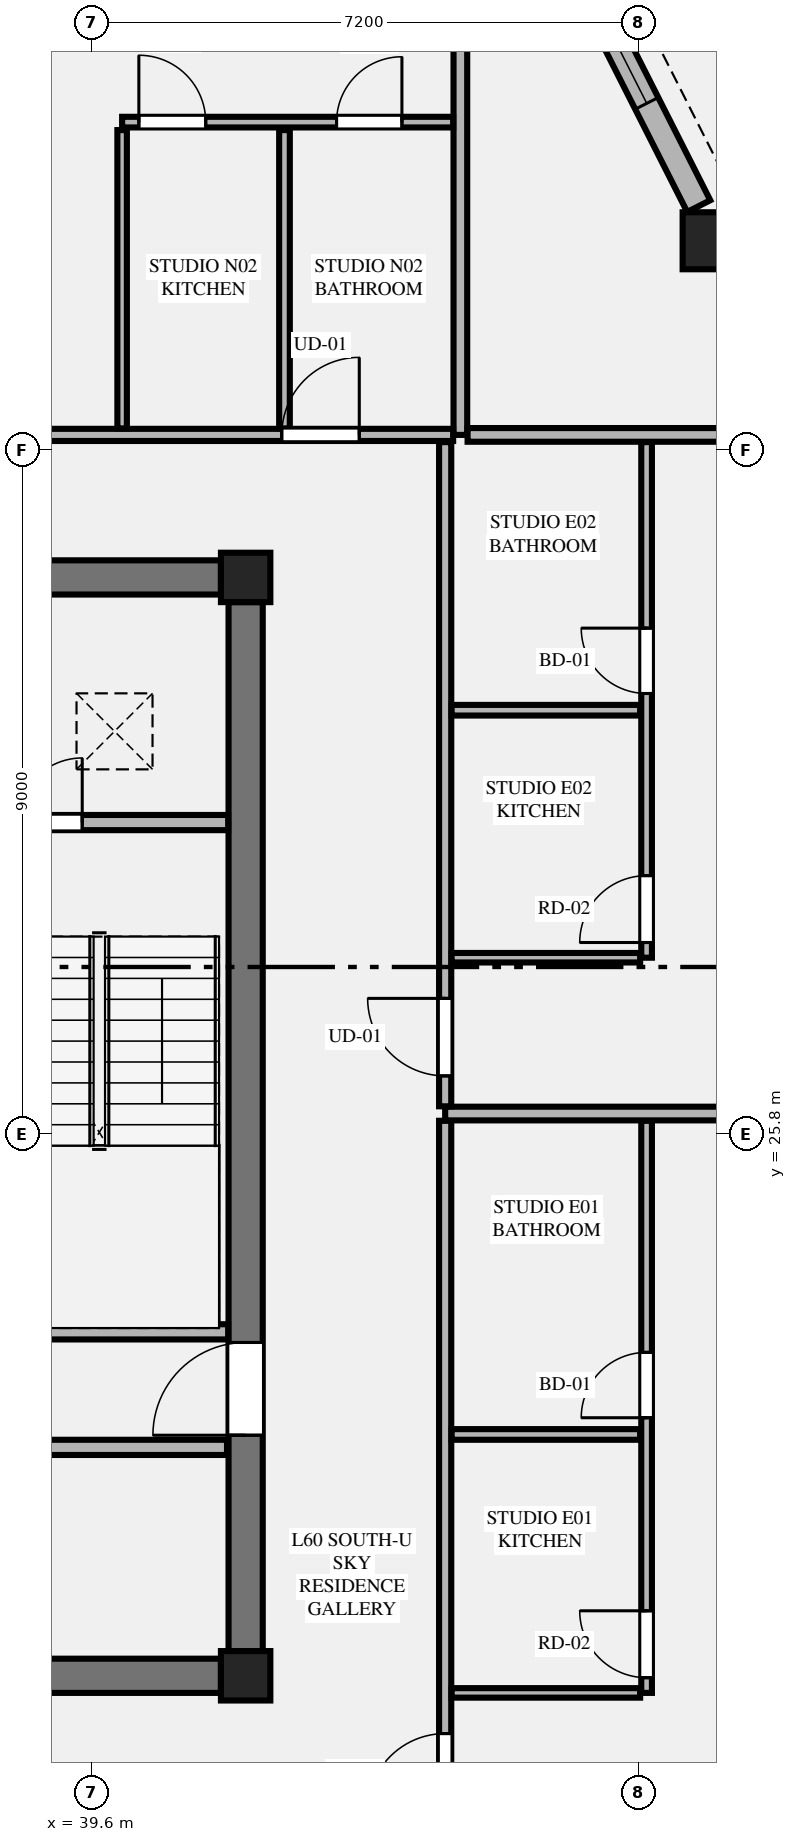
"""IFC4 building model, lengths in metres.
Left out: names, types, materials, properties, quantities, classifications, styles, units other than length and angle.
Written with IfcOpenShell. Run it as: python <this file> out.ifc"""

import sys

from ifc_helpers import new_model, si_unit, direction, frame, frame_2d, origin, origin_2d, place, context, subcontext, project, spatial, rectangle, extrude, element, fill, save


model = new_model("IFC4")
c1 = context("Model", 3, precision=1e-05, world=origin(), true_north=direction((0.0, 1.0)))
c2 = subcontext(c1, "Body", "Model", "MODEL_VIEW")
j1 = project(units=[si_unit("LENGTHUNIT", "METRE"), si_unit("PLANEANGLEUNIT", "RADIAN")], contexts=[c1])
p1 = place(None, origin())
s1 = spatial("IfcSite", under=j1, at=p1, CompositionType="ELEMENT")
p2 = place(p1, origin())
s2 = spatial("IfcBuilding", under=s1, at=p2, CompositionType="ELEMENT")
p3 = place(p2, frame((0.0, 0.0, 227.0)))
s3 = spatial("IfcBuildingStorey", under=s2, at=p3, CompositionType="ELEMENT", Elevation=227.0)
for number, where, z_axis, x_axis in (
    (1, (41.625, 18.675, 0.0), (0.0, 0.0, 1.0), (1.0, 0.0, 0.0)),
    (2, (41.625, 33.125, 0.0), (0.0, 0.0, 1.0), (1.0, 0.0, 0.0)),
):
    element("IfcColumn", number, at=place(p3, frame(where, z_axis=z_axis, x_axis=x_axis)), inside=s3, PredefinedType="COLUMN", context=c2, shape_type="SweptSolid", body=[
        extrude(rectangle(XDim=0.65, YDim=0.65, at=origin_2d()), origin(), (0.0, 0.0, 1.0), 3.65),
    ])
for number, where, z_axis, x_axis in (
    (3, (23.5, 18.675, 0.0), (0.0, 0.0, 1.0), (1.0, 0.0, 0.0)),
    (4, (23.5, 33.125, 0.0), (0.0, 0.0, 1.0), (1.0, 0.0, 0.0)),
):
    element("IfcWall", number, at=place(p3, frame(where, z_axis=z_axis, x_axis=x_axis)), inside=s3, PredefinedType="SHEAR", context=c2, shape_type="SweptSolid", body=[
        extrude(rectangle(XDim=17.8, YDim=0.45, at=frame_2d((8.9, 0.0))), origin(), (0.0, 0.0, 1.0), 3.45),
    ])
p4 = place(p3, frame((41.625, 19.0, 0.0), z_axis=(0.0, 0.0, 1.0), x_axis=(0.0, 1.0, 0.0)))
e5 = element("IfcWall", 5, at=p4, inside=s3, PredefinedType="SHEAR", context=c2, shape_type="SweptSolid", body=[
    extrude(rectangle(XDim=13.8, YDim=0.45, at=frame_2d((6.9, 0.0))), origin(), (0.0, 0.0, 1.0), 3.45),
])
p5 = place(p4, frame((2.84, 0.0, 0.0)))
e6 = element("IfcOpeningElement", 6, at=p5, cuts=e5, PredefinedType="OPENING", context=c2, shape_type="SweptSolid", body=[
    extrude(rectangle(XDim=1.22, YDim=2.25, at=frame_2d((0.61, 1.125))), frame((0.0, 0.235, 0.0), z_axis=(0.0, -1.0, 0.0), x_axis=(1.0, 0.0, 0.0)), (0.0, 0.0, 1.0), 0.47),
])
p6 = place(p3, frame((47.749, 37.554, 0.0), z_axis=(0.0, 0.0, 1.0), x_axis=(1.0, 0.0, 0.0)))
e7 = element("IfcColumn", 7, at=p6, inside=s3, PredefinedType="COLUMN", context=c2, shape_type="SweptSolid", body=[
    extrude(rectangle(XDim=0.75, YDim=0.75, at=origin_2d()), origin(), (0.0, 0.0, 1.0), 3.65),
])
p7 = place(p3, frame((38.125, 23.2, 0.0), z_axis=(0.0, 0.0, 1.0), x_axis=(1.0, 0.0, 0.0)))
e8 = element("IfcWall", 8, at=p7, inside=s3, PredefinedType="PLUMBINGWALL", context=c2, shape_type="SweptSolid", body=[
    extrude(rectangle(XDim=3.27, YDim=0.2, at=frame_2d((1.635, 0.0))), origin(), (0.0, 0.0, 1.0), 3.45),
])
p8 = place(p3, frame((38.125, 29.9, 0.0), z_axis=(0.0, 0.0, 1.0), x_axis=(1.0, 0.0, 0.0)))
e9 = element("IfcWall", 9, at=p8, inside=s3, PredefinedType="PLUMBINGWALL", context=c2, shape_type="SweptSolid", body=[
    extrude(rectangle(XDim=3.27, YDim=0.2, at=frame_2d((1.635, 0.0))), origin(), (0.0, 0.0, 1.0), 3.45),
])
p9 = place(p8, frame((0.5, 0.0, 0.0)))
e10 = element("IfcOpeningElement", 10, at=p9, cuts=e9, PredefinedType="OPENING", context=c2, shape_type="SweptSolid", body=[
    extrude(rectangle(XDim=0.85, YDim=2.05, at=frame_2d((0.425, 1.025))), frame((0.0, 0.11, 0.0), z_axis=(0.0, -1.0, 0.0), x_axis=(1.0, 0.0, 0.0)), (0.0, 0.0, 1.0), 0.22),
])
p10 = place(p3, frame((23.42, 21.68, 0.0), z_axis=(0.0, 0.0, 1.0), x_axis=(1.0, 0.0, 0.0)))
e11 = element("IfcWall", 11, at=p10, inside=s3, PredefinedType="PLUMBINGWALL", context=c2, shape_type="SweptSolid", body=[
    extrude(rectangle(XDim=17.96, YDim=0.2, at=frame_2d((8.98, 0.0))), origin(), (0.0, 0.0, 1.0), 3.45),
])
p11 = place(p10, frame((0.46, 0.0, 0.0)))
e12 = element("IfcOpeningElement", 12, at=p11, cuts=e11, PredefinedType="OPENING", context=c2, shape_type="SweptSolid", body=[
    extrude(rectangle(XDim=0.92, YDim=2.15, at=frame_2d((0.46, 1.075))), frame((0.0, 0.11, 0.0), z_axis=(0.0, -1.0, 0.0), x_axis=(1.0, 0.0, 0.0)), (0.0, 0.0, 1.0), 0.22),
])
p12 = place(p10, frame((9.48, 0.0, 0.0)))
e13 = element("IfcOpeningElement", 13, at=p12, cuts=e11, PredefinedType="OPENING", context=c2, shape_type="SweptSolid", body=[
    extrude(rectangle(XDim=0.92, YDim=2.15, at=frame_2d((0.46, 1.075))), frame((0.0, 0.11, 0.0), z_axis=(0.0, -1.0, 0.0), x_axis=(1.0, 0.0, 0.0)), (0.0, 0.0, 1.0), 0.22),
])
p13 = place(p3, frame((47.586, 38.01, 0.0), z_axis=(0.0, 0.0, 1.0), x_axis=(-0.451463046281, 0.89228981718, 0.0)))
e14 = element("IfcWall", 14, at=p13, inside=s3, PredefinedType="STANDARD", context=c2, shape_type="SweptSolid", body=[
    extrude(rectangle(XDim=4.43, YDim=0.34, at=frame_2d((2.215, 0.0))), origin(), (0.0, 0.0, 1.0), 2.983),
])
p14 = place(p13, frame((1.515, 0.0, 0.75)))
e15 = element("IfcOpeningElement", 15, at=p14, cuts=e14, PredefinedType="OPENING", context=c2, shape_type="SweptSolid", body=[
    extrude(rectangle(XDim=1.4, YDim=2.05, at=frame_2d((0.7, 1.025))), frame((0.0, 0.18, 0.0), z_axis=(0.0, -1.0, 0.0), x_axis=(1.0, 0.0, 0.0)), (0.0, 0.0, 1.0), 0.36),
])
p15 = place(p3, frame((44.45, 35.0, 0.0), z_axis=(0.0, 0.0, 1.0), x_axis=(0.0, 1.0, 0.0)))
e16 = element("IfcWall", 16, at=p15, inside=s3, PredefinedType="PARTITIONING", context=c2, shape_type="SweptSolid", body=[
    extrude(rectangle(XDim=8.481, YDim=0.18, at=frame_2d((4.24, 0.0))), origin(), (0.0, 0.0, 1.0), 3.45),
])
p16 = place(p3, frame((35.749, 35.0, 0.0), z_axis=(0.0, 0.0, 1.0), x_axis=(1.0, 0.0, 0.0)))
e17 = element("IfcWall", 17, at=p16, inside=s3, PredefinedType="PARTITIONING", context=c2, shape_type="SweptSolid", body=[
    extrude(rectangle(XDim=8.606, YDim=0.16, at=frame_2d((4.303, 0.0))), origin(), (0.0, 0.0, 1.0), 3.45),
])
p17 = place(p16, frame((6.351, 0.0, 0.0)))
e18 = element("IfcOpeningElement", 18, at=p17, cuts=e17, PredefinedType="OPENING", context=c2, shape_type="SweptSolid", body=[
    extrude(rectangle(XDim=1.02, YDim=2.25, at=frame_2d((0.51, 1.125))), frame((0.0, 0.09, 0.0), z_axis=(0.0, -1.0, 0.0), x_axis=(1.0, 0.0, 0.0)), (0.0, 0.0, 1.0), 0.18),
])
p18 = place(p3, frame((40.0, 35.085, 0.0), z_axis=(0.0, 0.0, 1.0), x_axis=(0.0, 1.0, 0.0)))
e19 = element("IfcWall", 19, at=p18, inside=s3, PredefinedType="PARTITIONING", context=c2, shape_type="SweptSolid", body=[
    extrude(rectangle(XDim=3.925, YDim=0.125, at=frame_2d((1.962, 0.0))), origin(), (0.0, 0.0, 1.0), 3.45),
])
p19 = place(p3, frame((40.0, 39.115, 0.0), z_axis=(0.0, 0.0, 1.0), x_axis=(1.0, 0.0, 0.0)))
e20 = element("IfcWall", 20, at=p19, inside=s3, PredefinedType="PLUMBINGWALL", context=c2, shape_type="SweptSolid", body=[
    extrude(rectangle(XDim=4.355, YDim=0.14, at=frame_2d((2.177, 0.0))), origin(), (0.0, 0.0, 1.0), 3.45),
])
p20 = place(p19, frame((2.821, 0.0, 0.0)))
e21 = element("IfcOpeningElement", 21, at=p20, cuts=e20, PredefinedType="OPENING", context=c2, shape_type="SweptSolid", body=[
    extrude(rectangle(XDim=0.86, YDim=2.1, at=frame_2d((0.43, 1.05))), frame((0.0, 0.08, 0.0), z_axis=(0.0, -1.0, 0.0), x_axis=(1.0, 0.0, 0.0)), (0.0, 0.0, 1.0), 0.16),
])
p21 = place(p19, frame((0.22, 0.0, 0.0)))
e22 = element("IfcOpeningElement", 22, at=p21, cuts=e20, PredefinedType="OPENING", context=c2, shape_type="SweptSolid", body=[
    extrude(rectangle(XDim=0.88, YDim=2.15, at=frame_2d((0.44, 1.075))), frame((0.0, 0.08, 0.0), z_axis=(0.0, -1.0, 0.0), x_axis=(1.0, 0.0, 0.0)), (0.0, 0.0, 1.0), 0.16),
])
p22 = place(p3, frame((42.136, 35.085, 0.0), z_axis=(0.0, 0.0, 1.0), x_axis=(0.0, 1.0, 0.0)))
e23 = element("IfcWall", 23, at=p22, inside=s3, PredefinedType="PLUMBINGWALL", context=c2, shape_type="SweptSolid", body=[
    extrude(rectangle(XDim=3.925, YDim=0.14, at=frame_2d((1.962, 0.0))), origin(), (0.0, 0.0, 1.0), 3.45),
])
p23 = place(p3, frame((44.545, 35.0, 0.0), z_axis=(0.0, 0.0, 1.0), x_axis=(1.0, 0.0, 0.0)))
e24 = element("IfcWall", 24, at=p23, inside=s3, PredefinedType="PARTITIONING", context=c2, shape_type="SweptSolid", body=[
    extrude(rectangle(XDim=4.322, YDim=0.18, at=frame_2d((2.161, 0.0))), origin(), (0.0, 0.0, 1.0), 3.45),
])
p24 = place(p3, frame((44.25, 16.495, 0.0), z_axis=(0.0, 0.0, 1.0), x_axis=(0.0, 1.0, 0.0)))
e25 = element("IfcWall", 25, at=p24, inside=s3, PredefinedType="PARTITIONING", context=c2, shape_type="SweptSolid", body=[
    extrude(rectangle(XDim=9.482, YDim=0.16, at=frame_2d((4.741, 0.0))), origin(), (0.0, 0.0, 1.0), 3.137),
])
p25 = place(p24, frame((0.4, 0.0, 0.0)))
e26 = element("IfcOpeningElement", 26, at=p25, cuts=e25, PredefinedType="OPENING", context=c2, shape_type="SweptSolid", body=[
    extrude(rectangle(XDim=1.02, YDim=2.25, at=frame_2d((0.51, 1.125))), frame((0.0, 0.09, 0.0), z_axis=(0.0, -1.0, 0.0), x_axis=(1.0, 0.0, 0.0)), (0.0, 0.0, 1.0), 0.18),
])
p26 = place(p3, frame((44.335, 18.45, 0.0), z_axis=(0.0, 0.0, 1.0), x_axis=(1.0, 0.0, 0.0)))
e27 = element("IfcWall", 27, at=p26, inside=s3, PredefinedType="PARTITIONING", context=c2, shape_type="SweptSolid", body=[
    extrude(rectangle(XDim=2.48, YDim=0.125, at=frame_2d((1.24, 0.0))), origin(), (0.0, 0.0, 1.0), 3.45),
])
p27 = place(p3, frame((46.9, 18.45, 0.0), z_axis=(0.0, 0.0, 1.0), x_axis=(0.0, 1.0, 0.0)))
e28 = element("IfcWall", 28, at=p27, inside=s3, PredefinedType="PLUMBINGWALL", context=c2, shape_type="SweptSolid", body=[
    extrude(rectangle(XDim=7.527, YDim=0.14, at=frame_2d((3.764, 0.0))), origin(), (0.0, 0.0, 1.0), 3.45),
])
p28 = place(p27, frame((3.62, 0.0, 0.0)))
e29 = element("IfcOpeningElement", 29, at=p28, cuts=e28, PredefinedType="OPENING", context=c2, shape_type="SweptSolid", body=[
    extrude(rectangle(XDim=0.86, YDim=2.1, at=frame_2d((0.43, 1.05))), frame((0.0, 0.08, 0.0), z_axis=(0.0, -1.0, 0.0), x_axis=(1.0, 0.0, 0.0)), (0.0, 0.0, 1.0), 0.16),
])
p29 = place(p27, frame((0.2, 0.0, 0.0)))
e30 = element("IfcOpeningElement", 30, at=p29, cuts=e28, PredefinedType="OPENING", context=c2, shape_type="SweptSolid", body=[
    extrude(rectangle(XDim=0.88, YDim=2.15, at=frame_2d((0.44, 1.075))), frame((0.0, 0.08, 0.0), z_axis=(0.0, -1.0, 0.0), x_axis=(1.0, 0.0, 0.0)), (0.0, 0.0, 1.0), 0.16),
])
p30 = place(p3, frame((44.335, 21.85, 0.0), z_axis=(0.0, 0.0, 1.0), x_axis=(1.0, 0.0, 0.0)))
e31 = element("IfcWall", 31, at=p30, inside=s3, PredefinedType="PLUMBINGWALL", context=c2, shape_type="SweptSolid", body=[
    extrude(rectangle(XDim=2.48, YDim=0.14, at=frame_2d((1.24, 0.0))), origin(), (0.0, 0.0, 1.0), 3.45),
])
p31 = place(p3, frame((44.25, 26.072, 0.0), z_axis=(0.0, 0.0, 1.0), x_axis=(1.0, 0.0, 0.0)))
e32 = element("IfcWall", 32, at=p31, inside=s3, PredefinedType="PARTITIONING", context=c2, shape_type="SweptSolid", body=[
    extrude(rectangle(XDim=8.898, YDim=0.18, at=frame_2d((4.449, 0.0))), origin(), (0.0, 0.0, 1.0), 3.45),
])
p32 = place(p3, frame((44.25, 26.167, 0.0), z_axis=(0.0, 0.0, 1.0), x_axis=(0.0, 1.0, 0.0)))
e33 = element("IfcWall", 33, at=p32, inside=s3, PredefinedType="PARTITIONING", context=c2, shape_type="SweptSolid", body=[
    extrude(rectangle(XDim=8.738, YDim=0.16, at=frame_2d((4.369, 0.0))), origin(), (0.0, 0.0, 1.0), 3.137),
])
p33 = place(p32, frame((0.4, 0.0, 0.0)))
e34 = element("IfcOpeningElement", 34, at=p33, cuts=e33, PredefinedType="OPENING", context=c2, shape_type="SweptSolid", body=[
    extrude(rectangle(XDim=1.02, YDim=2.25, at=frame_2d((0.51, 1.125))), frame((0.0, 0.09, 0.0), z_axis=(0.0, -1.0, 0.0), x_axis=(1.0, 0.0, 0.0)), (0.0, 0.0, 1.0), 0.18),
])
p34 = place(p3, frame((44.335, 28.122, 0.0), z_axis=(0.0, 0.0, 1.0), x_axis=(1.0, 0.0, 0.0)))
e35 = element("IfcWall", 35, at=p34, inside=s3, PredefinedType="PARTITIONING", context=c2, shape_type="SweptSolid", body=[
    extrude(rectangle(XDim=2.48, YDim=0.125, at=frame_2d((1.24, 0.0))), origin(), (0.0, 0.0, 1.0), 3.45),
])
p35 = place(p3, frame((46.9, 28.122, 0.0), z_axis=(0.0, 0.0, 1.0), x_axis=(0.0, 1.0, 0.0)))
e36 = element("IfcWall", 36, at=p35, inside=s3, PredefinedType="PLUMBINGWALL", context=c2, shape_type="SweptSolid", body=[
    extrude(rectangle(XDim=6.783, YDim=0.14, at=frame_2d((3.392, 0.0))), origin(), (0.0, 0.0, 1.0), 3.45),
])
p36 = place(p35, frame((3.476, 0.0, 0.0)))
e37 = element("IfcOpeningElement", 37, at=p36, cuts=e36, PredefinedType="OPENING", context=c2, shape_type="SweptSolid", body=[
    extrude(rectangle(XDim=0.86, YDim=2.1, at=frame_2d((0.43, 1.05))), frame((0.0, 0.08, 0.0), z_axis=(0.0, -1.0, 0.0), x_axis=(1.0, 0.0, 0.0)), (0.0, 0.0, 1.0), 0.16),
])
p37 = place(p35, frame((0.2, 0.0, 0.0)))
e38 = element("IfcOpeningElement", 38, at=p37, cuts=e36, PredefinedType="OPENING", context=c2, shape_type="SweptSolid", body=[
    extrude(rectangle(XDim=0.88, YDim=2.15, at=frame_2d((0.44, 1.075))), frame((0.0, 0.08, 0.0), z_axis=(0.0, -1.0, 0.0), x_axis=(1.0, 0.0, 0.0)), (0.0, 0.0, 1.0), 0.16),
])
p38 = place(p3, frame((44.335, 31.378, 0.0), z_axis=(0.0, 0.0, 1.0), x_axis=(1.0, 0.0, 0.0)))
e39 = element("IfcWall", 39, at=p38, inside=s3, PredefinedType="PLUMBINGWALL", context=c2, shape_type="SweptSolid", body=[
    extrude(rectangle(XDim=2.48, YDim=0.14, at=frame_2d((1.24, 0.0))), origin(), (0.0, 0.0, 1.0), 3.45),
])
p39 = place(p5, origin())
e40 = element("IfcDoor", 40, at=p39, inside=s3, OperationType="SINGLE_SWING_LEFT", PredefinedType="DOOR", context=c2, shape_type="SweptSolid", body=[
    extrude(rectangle(XDim=1.22, YDim=2.25, at=frame_2d((0.61, 1.125))), frame((0.0, 0.025, 0.0), z_axis=(0.0, -1.0, 0.0), x_axis=(1.0, 0.0, 0.0)), (0.0, 0.0, 1.0), 0.05),
])
fill(e6, e40)
p40 = place(p9, origin())
e41 = element("IfcDoor", 41, at=p40, inside=s3, OperationType="SINGLE_SWING_RIGHT", PredefinedType="DOOR", context=c2, shape_type="SweptSolid", body=[
    extrude(rectangle(XDim=0.85, YDim=2.05, at=frame_2d((0.425, 1.025))), frame((0.0, 0.025, 0.0), z_axis=(0.0, -1.0, 0.0), x_axis=(1.0, 0.0, 0.0)), (0.0, 0.0, 1.0), 0.05),
])
fill(e10, e41)
p41 = place(p14, origin())
e42 = element("IfcWindow", 42, at=p41, inside=s3, PartitioningType="SINGLE_PANEL", PredefinedType="WINDOW", context=c2, shape_type="SweptSolid", body=[
    extrude(rectangle(XDim=1.4, YDim=2.05, at=frame_2d((0.7, 1.025))), frame((0.0, 0.03, 0.0), z_axis=(0.0, -1.0, 0.0), x_axis=(1.0, 0.0, 0.0)), (0.0, 0.0, 1.0), 0.06),
])
fill(e15, e42)
p42 = place(p20, origin())
e43 = element("IfcDoor", 43, at=p42, inside=s3, OperationType="SINGLE_SWING_RIGHT", PredefinedType="DOOR", context=c2, shape_type="SweptSolid", body=[
    extrude(rectangle(XDim=0.86, YDim=2.1, at=frame_2d((0.43, 1.05))), frame((0.0, 0.025, 0.0), z_axis=(0.0, -1.0, 0.0), x_axis=(1.0, 0.0, 0.0)), (0.0, 0.0, 1.0), 0.05),
])
fill(e21, e43)
p43 = place(p17, origin())
e44 = element("IfcDoor", 44, at=p43, inside=s3, OperationType="SINGLE_SWING_RIGHT", PredefinedType="DOOR", context=c2, shape_type="SweptSolid", body=[
    extrude(rectangle(XDim=1.02, YDim=2.25, at=frame_2d((0.51, 1.125))), frame((0.0, 0.025, 0.0), z_axis=(0.0, -1.0, 0.0), x_axis=(1.0, 0.0, 0.0)), (0.0, 0.0, 1.0), 0.05),
])
fill(e18, e44)
p44 = place(p21, origin())
e45 = element("IfcDoor", 45, at=p44, inside=s3, OperationType="SINGLE_SWING_LEFT", PredefinedType="DOOR", context=c2, shape_type="SweptSolid", body=[
    extrude(rectangle(XDim=0.88, YDim=2.15, at=frame_2d((0.44, 1.075))), frame((0.0, 0.025, 0.0), z_axis=(0.0, -1.0, 0.0), x_axis=(1.0, 0.0, 0.0)), (0.0, 0.0, 1.0), 0.05),
])
fill(e22, e45)
p45 = place(p28, origin())
e46 = element("IfcDoor", 46, at=p45, inside=s3, OperationType="SINGLE_SWING_LEFT", PredefinedType="DOOR", context=c2, shape_type="SweptSolid", body=[
    extrude(rectangle(XDim=0.86, YDim=2.1, at=frame_2d((0.43, 1.05))), frame((0.0, 0.025, 0.0), z_axis=(0.0, -1.0, 0.0), x_axis=(1.0, 0.0, 0.0)), (0.0, 0.0, 1.0), 0.05),
])
fill(e29, e46)
p46 = place(p25, origin())
e47 = element("IfcDoor", 47, at=p46, inside=s3, OperationType="SINGLE_SWING_LEFT", PredefinedType="DOOR", context=c2, shape_type="SweptSolid", body=[
    extrude(rectangle(XDim=1.02, YDim=2.25, at=frame_2d((0.51, 1.125))), frame((0.0, 0.025, 0.0), z_axis=(0.0, -1.0, 0.0), x_axis=(1.0, 0.0, 0.0)), (0.0, 0.0, 1.0), 0.05),
])
fill(e26, e47)
p47 = place(p29, origin())
e48 = element("IfcDoor", 48, at=p47, inside=s3, OperationType="SINGLE_SWING_RIGHT", PredefinedType="DOOR", context=c2, shape_type="SweptSolid", body=[
    extrude(rectangle(XDim=0.88, YDim=2.15, at=frame_2d((0.44, 1.075))), frame((0.0, 0.025, 0.0), z_axis=(0.0, -1.0, 0.0), x_axis=(1.0, 0.0, 0.0)), (0.0, 0.0, 1.0), 0.05),
])
fill(e30, e48)
p48 = place(p36, origin())
e49 = element("IfcDoor", 49, at=p48, inside=s3, OperationType="SINGLE_SWING_RIGHT", PredefinedType="DOOR", context=c2, shape_type="SweptSolid", body=[
    extrude(rectangle(XDim=0.86, YDim=2.1, at=frame_2d((0.43, 1.05))), frame((0.0, 0.025, 0.0), z_axis=(0.0, -1.0, 0.0), x_axis=(1.0, 0.0, 0.0)), (0.0, 0.0, 1.0), 0.05),
])
fill(e37, e49)
p49 = place(p33, origin())
e50 = element("IfcDoor", 50, at=p49, inside=s3, OperationType="SINGLE_SWING_RIGHT", PredefinedType="DOOR", context=c2, shape_type="SweptSolid", body=[
    extrude(rectangle(XDim=1.02, YDim=2.25, at=frame_2d((0.51, 1.125))), frame((0.0, 0.025, 0.0), z_axis=(0.0, -1.0, 0.0), x_axis=(1.0, 0.0, 0.0)), (0.0, 0.0, 1.0), 0.05),
])
fill(e34, e50)
p50 = place(p37, origin())
e51 = element("IfcDoor", 51, at=p50, inside=s3, OperationType="SINGLE_SWING_LEFT", PredefinedType="DOOR", context=c2, shape_type="SweptSolid", body=[
    extrude(rectangle(XDim=0.88, YDim=2.15, at=frame_2d((0.44, 1.075))), frame((0.0, 0.025, 0.0), z_axis=(0.0, -1.0, 0.0), x_axis=(1.0, 0.0, 0.0)), (0.0, 0.0, 1.0), 0.05),
])
fill(e38, e51)
save(model, sys.argv[1])
